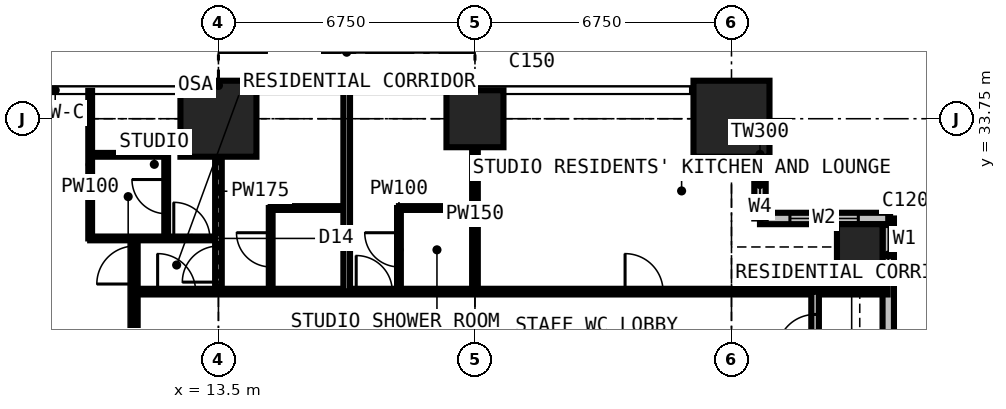
"""IFC4 building model, lengths in metres.
Left out: names, types, materials, properties, quantities, classifications, styles, units other than length and angle.
Written with IfcOpenShell. Run it as: python <this file> out.ifc"""

import sys

from ifc_helpers import new_model, si_unit, direction, frame, frame_2d, origin, origin_2d, place, context, subcontext, project, spatial, rectangle, extrude, element, fill, save


model = new_model("IFC4")
c1 = context("Model", 3, precision=1e-05, world=origin(), true_north=direction((0.0, 1.0)))
c2 = subcontext(c1, "Body", "Model", "MODEL_VIEW")
j1 = project(units=[si_unit("LENGTHUNIT", "METRE"), si_unit("PLANEANGLEUNIT", "RADIAN")], contexts=[c1])
p1 = place(None, origin())
s1 = spatial("IfcSite", under=j1, at=p1, CompositionType="ELEMENT")
p2 = place(p1, origin())
s2 = spatial("IfcBuilding", under=s1, at=p2, CompositionType="ELEMENT")
p3 = place(p2, frame((0.0, 0.0, 145.8)))
s3 = spatial("IfcBuildingStorey", under=s2, at=p3, CompositionType="ELEMENT", Elevation=145.8)
p4 = place(p3, frame((13.5, 33.75, 0.0), z_axis=(0.0, 0.0, 1.0), x_axis=(1.0, 0.0, 0.0)))
e1 = element("IfcColumn", 1, at=p4, inside=s3, PredefinedType="COLUMN", context=c2, shape_type="SweptSolid", body=[
    extrude(rectangle(XDim=2.0, YDim=2.0, at=origin_2d()), origin(), (0.0, 0.0, 1.0), 3.6),
])
p5 = place(p3, frame((20.25, 33.75, 0.0), z_axis=(0.0, 0.0, 1.0), x_axis=(1.0, 0.0, 0.0)))
e2 = element("IfcColumn", 2, at=p5, inside=s3, PredefinedType="COLUMN", context=c2, shape_type="SweptSolid", body=[
    extrude(rectangle(XDim=1.5, YDim=1.5, at=origin_2d()), origin(), (0.0, 0.0, 1.0), 3.6),
])
p6 = place(p3, frame((27.0, 33.75, 0.0), z_axis=(0.0, 0.0, 1.0), x_axis=(1.0, 0.0, 0.0)))
e3 = element("IfcColumn", 3, at=p6, inside=s3, PredefinedType="COLUMN", context=c2, shape_type="SweptSolid", body=[
    extrude(rectangle(XDim=2.0, YDim=2.0, at=origin_2d()), origin(), (0.0, 0.0, 1.0), 3.6),
])
p7 = place(p3, frame((30.375, 30.375, 0.0), z_axis=(0.0, 0.0, 1.0), x_axis=(1.0, 0.0, 0.0)))
e4 = element("IfcColumn", 4, at=p7, inside=s3, PredefinedType="COLUMN", context=c2, shape_type="SweptSolid", body=[
    extrude(rectangle(XDim=1.2, YDim=1.2, at=origin_2d()), origin(), (0.0, 0.0, 1.0), 3.6),
])
p8 = place(p3, frame((31.125, 27.75, 0.0), z_axis=(0.0, 0.0, 1.0), x_axis=(0.0, 1.0, 0.0)))
e5 = element("IfcWall", 5, at=p8, inside=s3, PredefinedType="SOLIDWALL", context=c2, shape_type="SweptSolid", body=[
    extrude(rectangle(XDim=3.375, YDim=0.3, at=frame_2d((1.688, 0.0))), origin(), (0.0, 0.0, 1.0), 3.375),
])
p9 = place(p8, frame((1.663, 0.0, 0.9)))
e6 = element("IfcOpeningElement", 6, at=p9, cuts=e5, PredefinedType="OPENING", context=c2, shape_type="SweptSolid", body=[
    extrude(rectangle(XDim=1.5, YDim=1.8, at=frame_2d((0.75, 0.9))), frame((0.0, 0.16, 0.0), z_axis=(0.0, -1.0, 0.0), x_axis=(1.0, 0.0, 0.0)), (0.0, 0.0, 1.0), 0.32),
])
p10 = place(p3, frame((31.125, 31.125, 0.0), z_axis=(0.0, 0.0, 1.0), x_axis=(-1.0, 0.0, 0.0)))
e7 = element("IfcWall", 7, at=p10, inside=s3, PredefinedType="SOLIDWALL", context=c2, shape_type="SweptSolid", body=[
    extrude(rectangle(XDim=3.375, YDim=0.3, at=frame_2d((1.688, 0.0))), origin(), (0.0, 0.0, 1.0), 3.375),
])
p11 = place(p10, frame((0.788, 0.0, 0.6)))
e8 = element("IfcOpeningElement", 8, at=p11, cuts=e7, PredefinedType="OPENING", context=c2, shape_type="SweptSolid", body=[
    extrude(rectangle(XDim=1.8, YDim=2.1, at=frame_2d((0.9, 1.05))), frame((0.0, 0.16, 0.0), z_axis=(0.0, -1.0, 0.0), x_axis=(1.0, 0.0, 0.0)), (0.0, 0.0, 1.0), 0.32),
])
p12 = place(p3, frame((27.75, 31.125, 0.0), z_axis=(0.0, 0.0, 1.0), x_axis=(0.0, 1.0, 0.0)))
e9 = element("IfcWall", 9, at=p12, inside=s3, PredefinedType="SOLIDWALL", context=c2, shape_type="SweptSolid", body=[
    extrude(rectangle(XDim=3.375, YDim=0.3, at=frame_2d((1.688, 0.0))), origin(), (0.0, 0.0, 1.0), 3.375),
])
p13 = place(p12, frame((0.292, 0.0, 0.9)))
e10 = element("IfcOpeningElement", 10, at=p13, cuts=e9, PredefinedType="OPENING", context=c2, shape_type="SweptSolid", body=[
    extrude(rectangle(XDim=1.2, YDim=1.8, at=frame_2d((0.6, 0.9))), frame((0.0, 0.16, 0.0), z_axis=(0.0, -1.0, 0.0), x_axis=(1.0, 0.0, 0.0)), (0.0, 0.0, 1.0), 0.32),
])
p14 = place(p3, frame((10.125, 30.6, 0.0), z_axis=(0.0, 0.0, 1.0), x_axis=(0.0, 1.0, 0.0)))
e11 = element("IfcWall", 11, at=p14, inside=s3, PredefinedType="PARTITIONING", context=c2, shape_type="SweptSolid", body=[
    extrude(rectangle(XDim=3.884, YDim=0.1, at=frame_2d((1.942, 0.0))), origin(), (0.0, 0.0, 1.0), 3.375),
])
p15 = place(p3, frame((10.125, 30.6, 0.0), z_axis=(0.0, 0.0, 1.0), x_axis=(1.0, 0.0, 0.0)))
e12 = element("IfcWall", 12, at=p15, inside=s3, PredefinedType="PARTITIONING", context=c2, shape_type="SweptSolid", body=[
    extrude(rectangle(XDim=3.375, YDim=0.1, at=frame_2d((1.688, 0.0))), origin(), (0.0, 0.0, 1.0), 3.375),
])
p16 = place(p15, frame((2.2, 0.0, 0.0)))
e13 = element("IfcOpeningElement", 13, at=p16, cuts=e12, PredefinedType="OPENING", context=c2, shape_type="SweptSolid", body=[
    extrude(rectangle(XDim=0.95, YDim=2.2, at=frame_2d((0.475, 1.1))), frame((0.0, 0.06, 0.0), z_axis=(0.0, -1.0, 0.0), x_axis=(1.0, 0.0, 0.0)), (0.0, 0.0, 1.0), 0.12),
])
p17 = place(p3, frame((10.125, 32.8, 0.0), z_axis=(0.0, 0.0, 1.0), x_axis=(1.0, 0.0, 0.0)))
e14 = element("IfcWall", 14, at=p17, inside=s3, PredefinedType="PARTITIONING", context=c2, shape_type="SweptSolid", body=[
    extrude(rectangle(XDim=2.0, YDim=0.1, at=frame_2d((1.0, 0.0))), origin(), (0.0, 0.0, 1.0), 3.375),
])
p18 = place(p3, frame((11.3, 11.3, 0.0), z_axis=(0.0, 0.0, 1.0), x_axis=(0.0, 1.0, 0.0)))
e15 = element("IfcWall", 15, at=p18, inside=s3, PredefinedType="PARTITIONING", context=c2, shape_type="SweptSolid", body=[
    extrude(rectangle(XDim=19.3, YDim=0.15, at=frame_2d((9.65, 0.0))), origin(), (0.0, 0.0, 1.0), 3.375),
])
p19 = place(p18, frame((18.1, 0.0, 0.0)))
e16 = element("IfcOpeningElement", 16, at=p19, cuts=e15, PredefinedType="OPENING", context=c2, shape_type="SweptSolid", body=[
    extrude(rectangle(XDim=1.0, YDim=2.2, at=frame_2d((0.5, 1.1))), frame((0.0, 0.085, 0.0), z_axis=(0.0, -1.0, 0.0), x_axis=(1.0, 0.0, 0.0)), (0.0, 0.0, 1.0), 0.17),
])
p20 = place(p18, frame((10.137, 0.0, 0.0)))
e17 = element("IfcOpeningElement", 17, at=p20, cuts=e15, PredefinedType="OPENING", context=c2, shape_type="SweptSolid", body=[
    extrude(rectangle(XDim=1.0, YDim=2.2, at=frame_2d((0.5, 1.1))), frame((0.0, 0.085, 0.0), z_axis=(0.0, -1.0, 0.0), x_axis=(1.0, 0.0, 0.0)), (0.0, 0.0, 1.0), 0.17),
])
p21 = place(p3, frame((11.3, 29.2, 0.0), z_axis=(0.0, 0.0, 1.0), x_axis=(1.0, 0.0, 0.0)))
e18 = element("IfcWall", 18, at=p21, inside=s3, PredefinedType="PARTITIONING", context=c2, shape_type="SweptSolid", body=[
    extrude(rectangle(XDim=19.809, YDim=0.15, at=frame_2d((9.904, 0.0))), origin(), (0.0, 0.0, 1.0), 3.375),
])
p22 = place(p21, frame((12.9, 0.0, 0.0)))
e19 = element("IfcOpeningElement", 19, at=p22, cuts=e18, PredefinedType="OPENING", context=c2, shape_type="SweptSolid", body=[
    extrude(rectangle(XDim=1.0, YDim=2.2, at=frame_2d((0.5, 1.1))), frame((0.0, 0.085, 0.0), z_axis=(0.0, -1.0, 0.0), x_axis=(1.0, 0.0, 0.0)), (0.0, 0.0, 1.0), 0.17),
])
p23 = place(p21, frame((5.825, 0.0, 0.0)))
e20 = element("IfcOpeningElement", 20, at=p23, cuts=e18, PredefinedType="OPENING", context=c2, shape_type="SweptSolid", body=[
    extrude(rectangle(XDim=0.95, YDim=2.2, at=frame_2d((0.475, 1.1))), frame((0.0, 0.085, 0.0), z_axis=(0.0, -1.0, 0.0), x_axis=(1.0, 0.0, 0.0)), (0.0, 0.0, 1.0), 0.17),
])
p24 = place(p21, frame((0.6, 0.0, 0.0)))
e21 = element("IfcOpeningElement", 21, at=p24, cuts=e18, PredefinedType="OPENING", context=c2, shape_type="SweptSolid", body=[
    extrude(rectangle(XDim=1.0, YDim=2.2, at=frame_2d((0.5, 1.1))), frame((0.0, 0.085, 0.0), z_axis=(0.0, -1.0, 0.0), x_axis=(1.0, 0.0, 0.0)), (0.0, 0.0, 1.0), 0.17),
])
p25 = place(p3, frame((12.125, 30.6, 0.0), z_axis=(0.0, 0.0, 1.0), x_axis=(0.0, 1.0, 0.0)))
e22 = element("IfcWall", 22, at=p25, inside=s3, PredefinedType="PARTITIONING", context=c2, shape_type="SweptSolid", body=[
    extrude(rectangle(XDim=2.2, YDim=0.1, at=frame_2d((1.1, 0.0))), origin(), (0.0, 0.0, 1.0), 3.375),
])
p26 = place(p25, frame((0.65, 0.0, 0.0)))
e23 = element("IfcOpeningElement", 23, at=p26, cuts=e22, PredefinedType="OPENING", context=c2, shape_type="SweptSolid", body=[
    extrude(rectangle(XDim=0.9, YDim=2.2, at=frame_2d((0.45, 1.1))), frame((0.0, 0.06, 0.0), z_axis=(0.0, -1.0, 0.0), x_axis=(1.0, 0.0, 0.0)), (0.0, 0.0, 1.0), 0.12),
])
p27 = place(p3, frame((13.5, 29.2, 0.0), z_axis=(0.0, 0.0, 1.0), x_axis=(0.0, 1.0, 0.0)))
e24 = element("IfcWall", 24, at=p27, inside=s3, PredefinedType="PARTITIONING", context=c2, shape_type="SweptSolid", body=[
    extrude(rectangle(XDim=5.284, YDim=0.175, at=frame_2d((2.642, 0.0))), origin(), (0.0, 0.0, 1.0), 2.61),
])
p28 = place(p27, frame((0.25, 0.0, 0.0)))
e25 = element("IfcOpeningElement", 25, at=p28, cuts=e24, PredefinedType="OPENING", context=c2, shape_type="SweptSolid", body=[
    extrude(rectangle(XDim=0.95, YDim=2.2, at=frame_2d((0.475, 1.1))), frame((0.0, 0.097, 0.0), z_axis=(0.0, -1.0, 0.0), x_axis=(1.0, 0.0, 0.0)), (0.0, 0.0, 1.0), 0.195),
])
p29 = place(p3, frame((14.875, 29.2, 0.0), z_axis=(0.0, 0.0, 1.0), x_axis=(0.0, 1.0, 0.0)))
e26 = element("IfcWall", 26, at=p29, inside=s3, PredefinedType="PARTITIONING", context=c2, shape_type="SweptSolid", body=[
    extrude(rectangle(XDim=2.2, YDim=0.1, at=frame_2d((1.1, 0.0))), origin(), (0.0, 0.0, 1.0), 3.375),
])
p30 = place(p29, frame((0.65, 0.0, 0.0)))
e27 = element("IfcOpeningElement", 27, at=p30, cuts=e26, PredefinedType="OPENING", context=c2, shape_type="SweptSolid", body=[
    extrude(rectangle(XDim=0.9, YDim=2.2, at=frame_2d((0.45, 1.1))), frame((0.0, 0.06, 0.0), z_axis=(0.0, -1.0, 0.0), x_axis=(1.0, 0.0, 0.0)), (0.0, 0.0, 1.0), 0.12),
])
p31 = place(p3, frame((14.875, 31.4, 0.0), z_axis=(0.0, 0.0, 1.0), x_axis=(1.0, 0.0, 0.0)))
e28 = element("IfcWall", 28, at=p31, inside=s3, PredefinedType="PARTITIONING", context=c2, shape_type="SweptSolid", body=[
    extrude(rectangle(XDim=2.0, YDim=0.1, at=frame_2d((1.0, 0.0))), origin(), (0.0, 0.0, 1.0), 3.375),
])
p32 = place(p3, frame((16.875, 29.2, 0.0), z_axis=(0.0, 0.0, 1.0), x_axis=(0.0, 1.0, 0.0)))
e29 = element("IfcWall", 29, at=p32, inside=s3, PredefinedType="PARTITIONING", context=c2, shape_type="SweptSolid", body=[
    extrude(rectangle(XDim=5.284, YDim=0.175, at=frame_2d((2.642, 0.0))), origin(), (0.0, 0.0, 1.0), 3.375),
])
p33 = place(p3, frame((18.25, 29.2, 0.0), z_axis=(0.0, 0.0, 1.0), x_axis=(0.0, 1.0, 0.0)))
e30 = element("IfcWall", 30, at=p33, inside=s3, PredefinedType="PARTITIONING", context=c2, shape_type="SweptSolid", body=[
    extrude(rectangle(XDim=2.2, YDim=0.1, at=frame_2d((1.1, 0.0))), origin(), (0.0, 0.0, 1.0), 3.375),
])
p34 = place(p33, frame((0.65, 0.0, 0.0)))
e31 = element("IfcOpeningElement", 31, at=p34, cuts=e30, PredefinedType="OPENING", context=c2, shape_type="SweptSolid", body=[
    extrude(rectangle(XDim=0.9, YDim=2.2, at=frame_2d((0.45, 1.1))), frame((0.0, 0.06, 0.0), z_axis=(0.0, -1.0, 0.0), x_axis=(1.0, 0.0, 0.0)), (0.0, 0.0, 1.0), 0.12),
])
p35 = place(p3, frame((18.25, 31.4, 0.0), z_axis=(0.0, 0.0, 1.0), x_axis=(1.0, 0.0, 0.0)))
e32 = element("IfcWall", 32, at=p35, inside=s3, PredefinedType="PARTITIONING", context=c2, shape_type="SweptSolid", body=[
    extrude(rectangle(XDim=2.0, YDim=0.1, at=frame_2d((1.0, 0.0))), origin(), (0.0, 0.0, 1.0), 3.375),
])
p36 = place(p3, frame((20.25, 29.2, 0.0), z_axis=(0.0, 0.0, 1.0), x_axis=(0.0, 1.0, 0.0)))
e33 = element("IfcWall", 33, at=p36, inside=s3, PredefinedType="PARTITIONING", context=c2, shape_type="SweptSolid", body=[
    extrude(rectangle(XDim=5.284, YDim=0.15, at=frame_2d((2.642, 0.0))), origin(), (0.0, 0.0, 1.0), 2.61),
])
p37 = place(p3, frame((29.2, 11.3, 0.0), z_axis=(0.0, 0.0, 1.0), x_axis=(0.0, 1.0, 0.0)))
e34 = element("IfcWall", 34, at=p37, inside=s3, PredefinedType="PARTITIONING", context=c2, shape_type="SweptSolid", body=[
    extrude(rectangle(XDim=17.9, YDim=0.2, at=frame_2d((8.95, 0.0))), origin(), (0.0, 0.0, 1.0), 3.375),
])
p38 = place(p37, frame((5.775, 0.0, 0.0)))
e35 = element("IfcOpeningElement", 35, at=p38, cuts=e34, PredefinedType="OPENING", context=c2, shape_type="SweptSolid", body=[
    extrude(rectangle(XDim=0.95, YDim=2.2, at=frame_2d((0.475, 1.1))), frame((0.0, 0.11, 0.0), z_axis=(0.0, -1.0, 0.0), x_axis=(1.0, 0.0, 0.0)), (0.0, 0.0, 1.0), 0.22),
])
p39 = place(p37, frame((9.2, 0.0, 0.0)))
e36 = element("IfcOpeningElement", 36, at=p39, cuts=e34, PredefinedType="OPENING", context=c2, shape_type="SweptSolid", body=[
    extrude(rectangle(XDim=0.95, YDim=2.2, at=frame_2d((0.475, 1.1))), frame((0.0, 0.11, 0.0), z_axis=(0.0, -1.0, 0.0), x_axis=(1.0, 0.0, 0.0)), (0.0, 0.0, 1.0), 0.22),
])
p40 = place(p37, frame((12.575, 0.0, 0.0)))
e37 = element("IfcOpeningElement", 37, at=p40, cuts=e34, PredefinedType="OPENING", context=c2, shape_type="SweptSolid", body=[
    extrude(rectangle(XDim=0.95, YDim=2.2, at=frame_2d((0.475, 1.1))), frame((0.0, 0.11, 0.0), z_axis=(0.0, -1.0, 0.0), x_axis=(1.0, 0.0, 0.0)), (0.0, 0.0, 1.0), 0.22),
])
p41 = place(p37, frame((16.3, 0.0, 0.0)))
e38 = element("IfcOpeningElement", 38, at=p41, cuts=e34, PredefinedType="OPENING", context=c2, shape_type="SweptSolid", body=[
    extrude(rectangle(XDim=1.0, YDim=2.2, at=frame_2d((0.5, 1.1))), frame((0.0, 0.11, 0.0), z_axis=(0.0, -1.0, 0.0), x_axis=(1.0, 0.0, 0.0)), (0.0, 0.0, 1.0), 0.22),
])
p42 = place(p9, origin())
e39 = element("IfcWindow", 39, at=p42, inside=s3, PartitioningType="SINGLE_PANEL", PredefinedType="WINDOW", context=c2, shape_type="SweptSolid", body=[
    extrude(rectangle(XDim=1.5, YDim=1.8, at=frame_2d((0.75, 0.9))), frame((0.0, 0.03, 0.0), z_axis=(0.0, -1.0, 0.0), x_axis=(1.0, 0.0, 0.0)), (0.0, 0.0, 1.0), 0.06),
])
fill(e6, e39)
p43 = place(p11, origin())
e40 = element("IfcWindow", 40, at=p43, inside=s3, PartitioningType="SINGLE_PANEL", PredefinedType="WINDOW", context=c2, shape_type="SweptSolid", body=[
    extrude(rectangle(XDim=1.8, YDim=2.1, at=frame_2d((0.9, 1.05))), frame((0.0, 0.03, 0.0), z_axis=(0.0, -1.0, 0.0), x_axis=(1.0, 0.0, 0.0)), (0.0, 0.0, 1.0), 0.06),
])
fill(e8, e40)
p44 = place(p13, origin())
e41 = element("IfcWindow", 41, at=p44, inside=s3, PartitioningType="SINGLE_PANEL", PredefinedType="WINDOW", context=c2, shape_type="SweptSolid", body=[
    extrude(rectangle(XDim=1.2, YDim=1.8, at=frame_2d((0.6, 0.9))), frame((0.0, 0.03, 0.0), z_axis=(0.0, -1.0, 0.0), x_axis=(1.0, 0.0, 0.0)), (0.0, 0.0, 1.0), 0.06),
])
fill(e10, e41)
p45 = place(p41, origin())
e42 = element("IfcDoor", 42, at=p45, inside=s3, OperationType="SINGLE_SWING_LEFT", PredefinedType="DOOR", context=c2, shape_type="SweptSolid", body=[
    extrude(rectangle(XDim=1.0, YDim=2.2, at=frame_2d((0.5, 1.1))), frame((0.0, 0.025, 0.0), z_axis=(0.0, -1.0, 0.0), x_axis=(1.0, 0.0, 0.0)), (0.0, 0.0, 1.0), 0.05),
])
fill(e38, e42)
p46 = place(p22, origin())
e43 = element("IfcDoor", 43, at=p46, inside=s3, OperationType="SINGLE_SWING_LEFT", PredefinedType="DOOR", context=c2, shape_type="SweptSolid", body=[
    extrude(rectangle(XDim=1.0, YDim=2.2, at=frame_2d((0.5, 1.1))), frame((0.0, 0.025, 0.0), z_axis=(0.0, -1.0, 0.0), x_axis=(1.0, 0.0, 0.0)), (0.0, 0.0, 1.0), 0.05),
])
fill(e19, e43)
p47 = place(p16, origin())
e44 = element("IfcDoor", 44, at=p47, inside=s3, OperationType="SINGLE_SWING_LEFT", PredefinedType="DOOR", context=c2, shape_type="SweptSolid", body=[
    extrude(rectangle(XDim=0.95, YDim=2.2, at=frame_2d((0.475, 1.1))), frame((0.0, 0.025, 0.0), z_axis=(0.0, -1.0, 0.0), x_axis=(1.0, 0.0, 0.0)), (0.0, 0.0, 1.0), 0.05),
])
fill(e13, e44)
p48 = place(p26, origin())
e45 = element("IfcDoor", 45, at=p48, inside=s3, OperationType="SINGLE_SWING_RIGHT", PredefinedType="DOOR", context=c2, shape_type="SweptSolid", body=[
    extrude(rectangle(XDim=0.9, YDim=2.2, at=frame_2d((0.45, 1.1))), frame((0.0, 0.025, 0.0), z_axis=(0.0, -1.0, 0.0), x_axis=(1.0, 0.0, 0.0)), (0.0, 0.0, 1.0), 0.05),
])
fill(e23, e45)
p49 = place(p28, origin())
e46 = element("IfcDoor", 46, at=p49, inside=s3, OperationType="SINGLE_SWING_LEFT", PredefinedType="DOOR", context=c2, shape_type="SweptSolid", body=[
    extrude(rectangle(XDim=0.95, YDim=2.2, at=frame_2d((0.475, 1.1))), frame((0.0, 0.025, 0.0), z_axis=(0.0, -1.0, 0.0), x_axis=(1.0, 0.0, 0.0)), (0.0, 0.0, 1.0), 0.05),
])
fill(e25, e46)
p50 = place(p30, origin())
e47 = element("IfcDoor", 47, at=p50, inside=s3, OperationType="SINGLE_SWING_RIGHT", PredefinedType="DOOR", context=c2, shape_type="SweptSolid", body=[
    extrude(rectangle(XDim=0.9, YDim=2.2, at=frame_2d((0.45, 1.1))), frame((0.0, 0.025, 0.0), z_axis=(0.0, -1.0, 0.0), x_axis=(1.0, 0.0, 0.0)), (0.0, 0.0, 1.0), 0.05),
])
fill(e27, e47)
p51 = place(p23, origin())
e48 = element("IfcDoor", 48, at=p51, inside=s3, OperationType="SINGLE_SWING_LEFT", PredefinedType="DOOR", context=c2, shape_type="SweptSolid", body=[
    extrude(rectangle(XDim=0.95, YDim=2.2, at=frame_2d((0.475, 1.1))), frame((0.0, 0.025, 0.0), z_axis=(0.0, -1.0, 0.0), x_axis=(1.0, 0.0, 0.0)), (0.0, 0.0, 1.0), 0.05),
])
fill(e20, e48)
p52 = place(p34, origin())
e49 = element("IfcDoor", 49, at=p52, inside=s3, OperationType="SINGLE_SWING_RIGHT", PredefinedType="DOOR", context=c2, shape_type="SweptSolid", body=[
    extrude(rectangle(XDim=0.9, YDim=2.2, at=frame_2d((0.45, 1.1))), frame((0.0, 0.025, 0.0), z_axis=(0.0, -1.0, 0.0), x_axis=(1.0, 0.0, 0.0)), (0.0, 0.0, 1.0), 0.05),
])
fill(e31, e49)
p53 = place(p24, origin())
e50 = element("IfcDoor", 50, at=p53, inside=s3, OperationType="SINGLE_SWING_LEFT", PredefinedType="DOOR", context=c2, shape_type="SweptSolid", body=[
    extrude(rectangle(XDim=1.0, YDim=2.2, at=frame_2d((0.5, 1.1))), frame((0.0, 0.025, 0.0), z_axis=(0.0, -1.0, 0.0), x_axis=(1.0, 0.0, 0.0)), (0.0, 0.0, 1.0), 0.05),
])
fill(e21, e50)
p54 = place(p19, origin())
e51 = element("IfcDoor", 51, at=p54, inside=s3, OperationType="SINGLE_SWING_LEFT", PredefinedType="DOOR", context=c2, shape_type="SweptSolid", body=[
    extrude(rectangle(XDim=1.0, YDim=2.2, at=frame_2d((0.5, 1.1))), frame((0.0, 0.025, 0.0), z_axis=(0.0, -1.0, 0.0), x_axis=(1.0, 0.0, 0.0)), (0.0, 0.0, 1.0), 0.05),
])
fill(e16, e51)
save(model, sys.argv[1])
